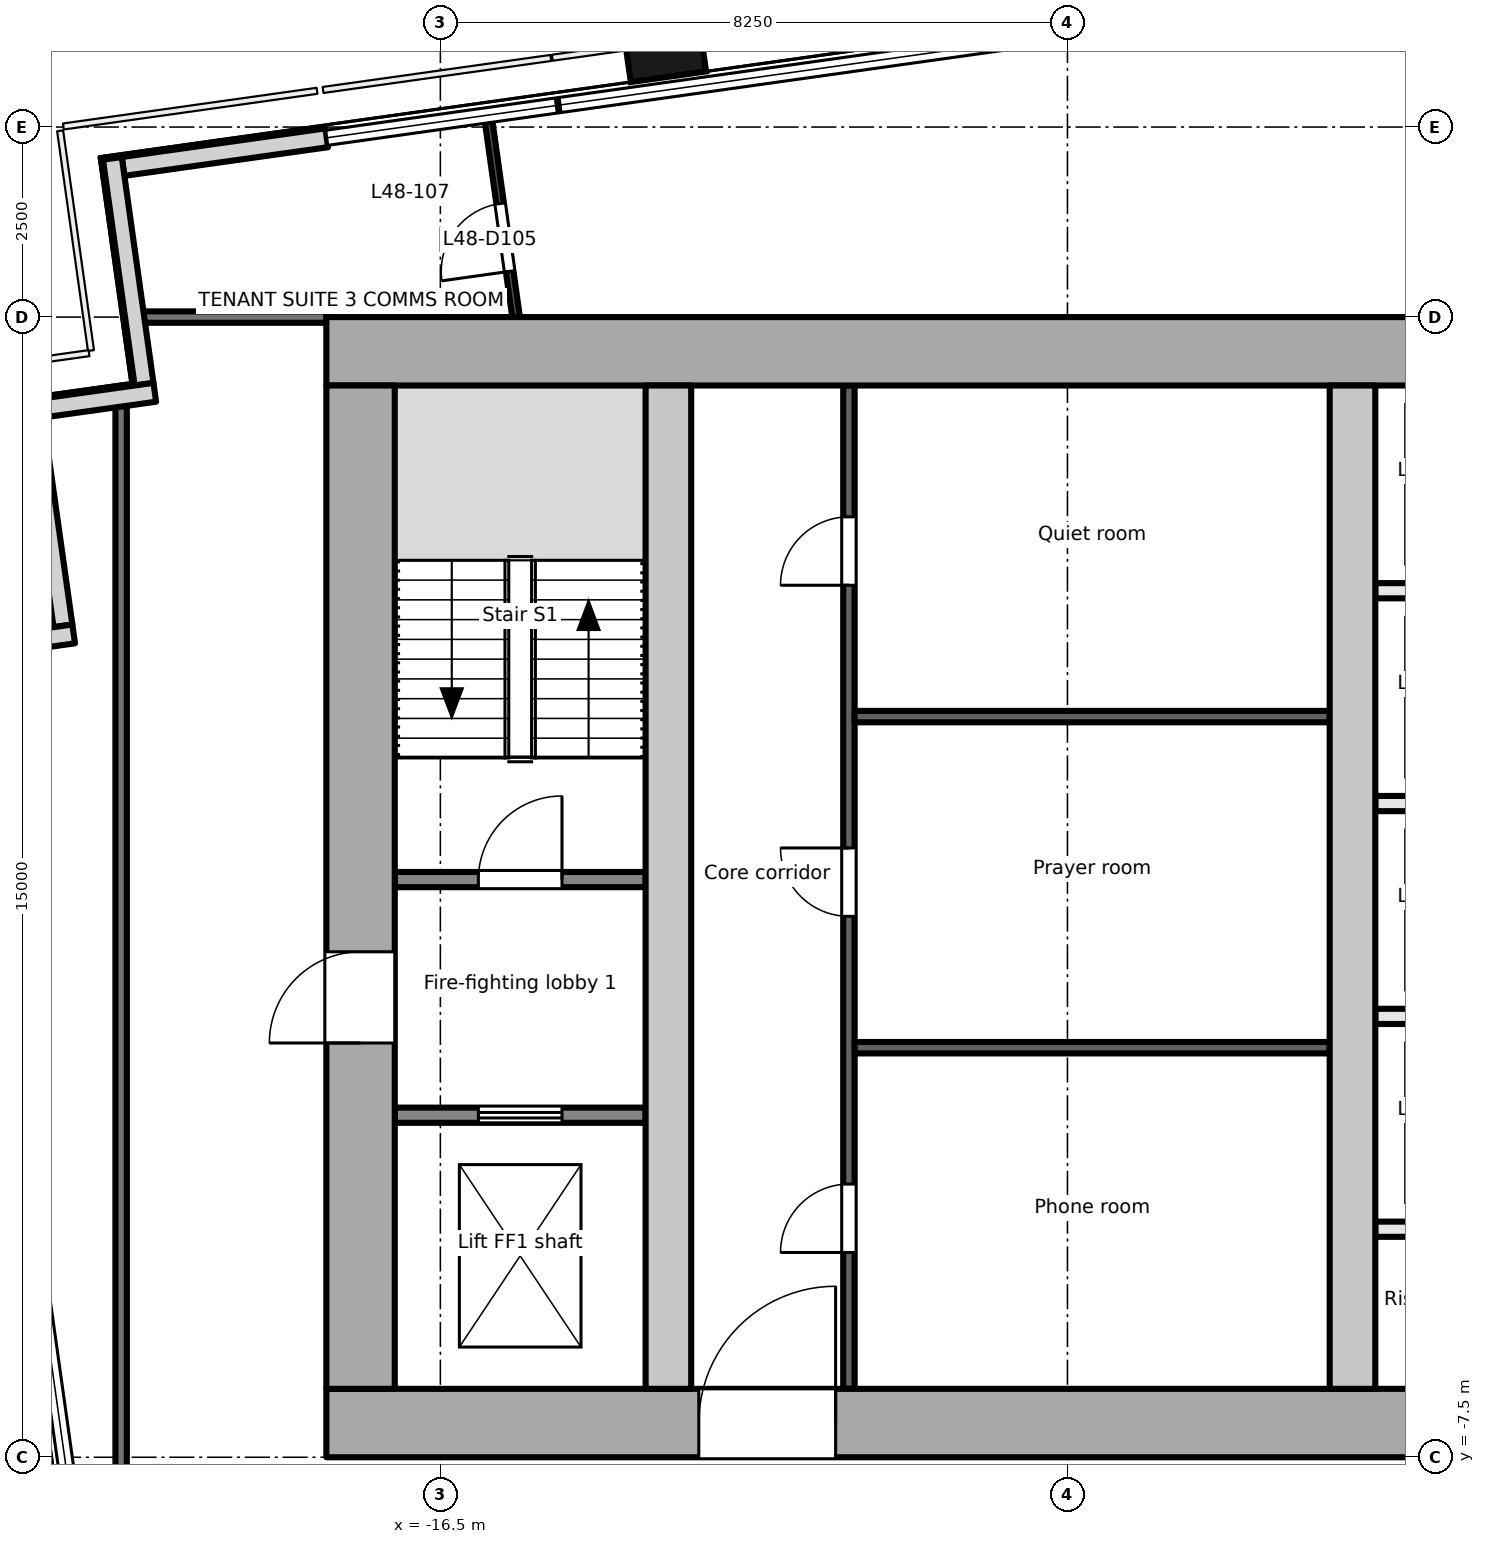
"""IFC4 building model, lengths in metres.
Left out: names, types, materials, properties, quantities, classifications, styles, units other than length and angle.
Written with IfcOpenShell. Run it as: python <this file> out.ifc"""

import sys

from ifc_helpers import new_model, si_unit, direction, frame, frame_2d, origin, origin_2d, place, context, subcontext, project, spatial, rectangle, extrude, element, fill, save


model = new_model("IFC4")
c1 = context("Model", 3, precision=1e-05, world=origin(), true_north=direction((0.0, 1.0)))
c2 = subcontext(c1, "Body", "Model", "MODEL_VIEW")
j1 = project(units=[si_unit("LENGTHUNIT", "METRE"), si_unit("PLANEANGLEUNIT", "RADIAN")], contexts=[c1])
p1 = place(None, origin())
s1 = spatial("IfcSite", under=j1, at=p1, CompositionType="ELEMENT")
p2 = place(p1, origin())
s2 = spatial("IfcBuilding", under=s1, at=p2, CompositionType="ELEMENT")
p3 = place(p2, frame((0.0, 0.0, 213.5)))
s3 = spatial("IfcBuildingStorey", under=s2, at=p3, CompositionType="ELEMENT", Elevation=213.5)
p4 = place(p3, frame((-13.625, 11.553, -0.2), z_axis=(0.0, 0.0, 1.0), x_axis=(0.990268068742, 0.13917310096, 0.0)))
e1 = element("IfcColumn", 1, at=p4, inside=s3, PredefinedType="COLUMN", context=c2, shape_type="SweptSolid", body=[
    extrude(rectangle(XDim=1.0, YDim=1.8, at=origin_2d()), origin(), (0.0, 0.0, 1.0), 3.9),
])
p5 = place(p3, frame((-17.995, 9.859, 0.0), z_axis=(0.0, 0.0, 1.0), x_axis=(-0.99024510326, -0.139336411139, 0.0)))
e2 = element("IfcWall", 2, at=p5, inside=s3, PredefinedType="SOLIDWALL", context=c2, shape_type="SweptSolid", body=[
    extrude(rectangle(XDim=2.705, YDim=0.25, at=frame_2d((1.353, 0.0))), origin(), (0.0, 0.0, 1.0), 3.7),
])
p6 = place(p3, frame((-20.815, 9.588, 0.0), z_axis=(0.0, 0.0, 1.0), x_axis=(0.138983028379, -0.9902947631, 0.0)))
e3 = element("IfcWall", 3, at=p6, inside=s3, PredefinedType="SOLIDWALL", context=c2, shape_type="SweptSolid", body=[
    extrude(rectangle(XDim=3.0, YDim=0.25, at=frame_2d((1.5, 0.0))), origin(), (0.0, 0.0, 1.0), 3.7),
])
p7 = place(p3, frame((-20.257, 6.51, 0.0), z_axis=(0.0, 0.0, 1.0), x_axis=(-0.990330117064, -0.138730887823, 0.0)))
e4 = element("IfcWall", 4, at=p7, inside=s3, PredefinedType="SOLIDWALL", context=c2, shape_type="SweptSolid", body=[
    extrude(rectangle(XDim=1.499, YDim=0.25, at=frame_2d((0.75, 0.0))), origin(), (0.0, 0.0, 1.0), 3.7),
])
p8 = place(p3, frame((-21.883, 6.409, 0.0), z_axis=(0.0, 0.0, 1.0), x_axis=(0.139324658755, -0.990246756855, 0.0)))
e5 = element("IfcWall", 5, at=p8, inside=s3, PredefinedType="SOLIDWALL", context=c2, shape_type="SweptSolid", body=[
    extrude(rectangle(XDim=3.0, YDim=0.25, at=frame_2d((1.5, 0.0))), origin(), (0.0, 0.0, 1.0), 3.7),
])
p9 = place(p3, frame((-21.324, 3.332, 0.0), z_axis=(0.0, 0.0, 1.0), x_axis=(-0.990238641016, -0.139382329723, 0.0)))
e6 = element("IfcWall", 6, at=p9, inside=s3, PredefinedType="SOLIDWALL", context=c2, shape_type="SweptSolid", body=[
    extrude(rectangle(XDim=1.526, YDim=0.25, at=frame_2d((0.763, 0.0))), origin(), (0.0, 0.0, 1.0), 3.7),
])
p10 = place(p3, frame((-18.0, -7.05, -0.2), z_axis=(0.0, 0.0, 1.0), x_axis=(1.0, 0.0, 0.0)))
e7 = element("IfcWall", 7, at=p10, inside=s3, PredefinedType="SHEAR", context=c2, shape_type="SweptSolid", body=[
    extrude(rectangle(XDim=36.0, YDim=0.9, at=frame_2d((18.0, 0.0))), origin(), (0.0, 0.0, 1.0), 3.9),
])
p11 = place(p10, frame((4.9, 0.0, 0.2)))
e8 = element("IfcOpeningElement", 8, at=p11, cuts=e7, PredefinedType="OPENING", context=c2, shape_type="SweptSolid", body=[
    extrude(rectangle(XDim=1.8, YDim=2.1, at=frame_2d((0.9, 1.05))), frame((0.0, 0.46, 0.0), z_axis=(0.0, -1.0, 0.0), x_axis=(1.0, 0.0, 0.0)), (0.0, 0.0, 1.0), 0.921),
])
p12 = place(p10, frame((16.8, 0.0, 0.2)))
e9 = element("IfcOpeningElement", 9, at=p12, cuts=e7, PredefinedType="OPENING", context=c2, shape_type="SweptSolid", body=[
    extrude(rectangle(XDim=2.4, YDim=2.1, at=frame_2d((1.2, 1.05))), frame((0.0, 0.46, 0.0), z_axis=(0.0, -1.0, 0.0), x_axis=(1.0, 0.0, 0.0)), (0.0, 0.0, 1.0), 0.921),
])
p13 = place(p10, frame((26.1, 0.0, 0.2)))
e10 = element("IfcOpeningElement", 10, at=p13, cuts=e7, PredefinedType="OPENING", context=c2, shape_type="SweptSolid", body=[
    extrude(rectangle(XDim=2.4, YDim=2.1, at=frame_2d((1.2, 1.05))), frame((0.0, 0.46, 0.0), z_axis=(0.0, -1.0, 0.0), x_axis=(1.0, 0.0, 0.0)), (0.0, 0.0, 1.0), 0.921),
])
p14 = place(p3, frame((-18.0, 7.05, -0.2), z_axis=(0.0, 0.0, 1.0), x_axis=(1.0, 0.0, 0.0)))
e11 = element("IfcWall", 11, at=p14, inside=s3, PredefinedType="SHEAR", context=c2, shape_type="SweptSolid", body=[
    extrude(rectangle(XDim=36.0, YDim=0.9, at=frame_2d((18.0, 0.0))), origin(), (0.0, 0.0, 1.0), 3.9),
])
p15 = place(p3, frame((-17.55, -6.6, -0.2), z_axis=(0.0, 0.0, 1.0), x_axis=(0.0, 1.0, 0.0)))
e12 = element("IfcWall", 12, at=p15, inside=s3, PredefinedType="SHEAR", context=c2, shape_type="SweptSolid", body=[
    extrude(rectangle(XDim=13.2, YDim=0.9, at=frame_2d((6.6, 0.0))), origin(), (0.0, 0.0, 1.0), 3.9),
])
p16 = place(p15, frame((4.55, 0.0, 0.2)))
e13 = element("IfcOpeningElement", 13, at=p16, cuts=e12, PredefinedType="OPENING", context=c2, shape_type="SweptSolid", body=[
    extrude(rectangle(XDim=1.2, YDim=2.1, at=frame_2d((0.6, 1.05))), frame((0.0, 0.46, 0.0), z_axis=(0.0, -1.0, 0.0), x_axis=(1.0, 0.0, 0.0)), (0.0, 0.0, 1.0), 0.921),
])
for number, where, z_axis, x_axis in (
    (14, (-13.5, -6.6, -0.2), (0.0, 0.0, 1.0), (0.0, 1.0, 0.0)),
    (15, (-4.5, -6.6, -0.2), (0.0, 0.0, 1.0), (0.0, 1.0, 0.0)),
):
    element("IfcWall", number, at=place(p3, frame(where, z_axis=z_axis, x_axis=x_axis)), inside=s3, PredefinedType="SHEAR", context=c2, shape_type="SweptSolid", body=[
        extrude(rectangle(XDim=13.2, YDim=0.6, at=frame_2d((6.6, 0.0))), origin(), (0.0, 0.0, 1.0), 3.9),
    ])
p17 = place(p3, frame((-17.1, -3.0, 0.0), z_axis=(0.0, 0.0, 1.0), x_axis=(1.0, 0.0, 0.0)))
e16 = element("IfcWall", 16, at=p17, inside=s3, PredefinedType="PARTITIONING", context=c2, shape_type="SweptSolid", body=[
    extrude(rectangle(XDim=3.3, YDim=0.2, at=frame_2d((1.65, 0.0))), origin(), (0.0, 0.0, 1.0), 3.7),
])
p18 = place(p17, frame((1.1, 0.0, 0.0)))
e17 = element("IfcOpeningElement", 17, at=p18, cuts=e16, PredefinedType="OPENING", context=c2, shape_type="SweptSolid", body=[
    extrude(rectangle(XDim=1.1, YDim=2.1, at=frame_2d((0.55, 1.05))), frame((0.0, 0.111, 0.0), z_axis=(0.0, -1.0, 0.0), x_axis=(1.0, 0.0, 0.0)), (0.0, 0.0, 1.0), 0.221),
])
p19 = place(p3, frame((-17.1, 0.1, 0.0), z_axis=(0.0, 0.0, 1.0), x_axis=(1.0, 0.0, 0.0)))
e18 = element("IfcWall", 18, at=p19, inside=s3, PredefinedType="PARTITIONING", context=c2, shape_type="SweptSolid", body=[
    extrude(rectangle(XDim=3.3, YDim=0.2, at=frame_2d((1.65, 0.0))), origin(), (0.0, 0.0, 1.0), 3.7),
])
p20 = place(p19, frame((1.1, 0.0, 0.0)))
e19 = element("IfcOpeningElement", 19, at=p20, cuts=e18, PredefinedType="OPENING", context=c2, shape_type="SweptSolid", body=[
    extrude(rectangle(XDim=1.1, YDim=2.1, at=frame_2d((0.55, 1.05))), frame((0.0, 0.111, 0.0), z_axis=(0.0, -1.0, 0.0), x_axis=(1.0, 0.0, 0.0)), (0.0, 0.0, 1.0), 0.221),
])
p21 = place(p3, frame((-11.125, -6.6, 0.0), z_axis=(0.0, 0.0, 1.0), x_axis=(0.0, 1.0, 0.0)))
e20 = element("IfcWall", 20, at=p21, inside=s3, PredefinedType="PARTITIONING", context=c2, shape_type="SweptSolid", body=[
    extrude(rectangle(XDim=13.2, YDim=0.15, at=frame_2d((6.6, 0.0))), origin(), (0.0, 0.0, 1.0), 3.7),
])
p22 = place(p21, frame((1.794, 0.0, 0.0)))
e21 = element("IfcOpeningElement", 21, at=p22, cuts=e20, PredefinedType="OPENING", context=c2, shape_type="SweptSolid", body=[
    extrude(rectangle(XDim=0.9, YDim=2.1, at=frame_2d((0.45, 1.05))), frame((0.0, 0.085, 0.0), z_axis=(0.0, -1.0, 0.0), x_axis=(1.0, 0.0, 0.0)), (0.0, 0.0, 1.0), 0.171),
])
p23 = place(p21, frame((6.216, 0.0, 0.0)))
e22 = element("IfcOpeningElement", 22, at=p23, cuts=e20, PredefinedType="OPENING", context=c2, shape_type="SweptSolid", body=[
    extrude(rectangle(XDim=0.9, YDim=2.1, at=frame_2d((0.45, 1.05))), frame((0.0, 0.085, 0.0), z_axis=(0.0, -1.0, 0.0), x_axis=(1.0, 0.0, 0.0)), (0.0, 0.0, 1.0), 0.171),
])
p24 = place(p21, frame((10.572, 0.0, 0.0)))
e23 = element("IfcOpeningElement", 23, at=p24, cuts=e20, PredefinedType="OPENING", context=c2, shape_type="SweptSolid", body=[
    extrude(rectangle(XDim=0.9, YDim=2.1, at=frame_2d((0.45, 1.05))), frame((0.0, 0.085, 0.0), z_axis=(0.0, -1.0, 0.0), x_axis=(1.0, 0.0, 0.0)), (0.0, 0.0, 1.0), 0.171),
])
for number, where, z_axis, x_axis in (
    (24, (-11.05, -2.112, 0.0), (0.0, 0.0, 1.0), (1.0, 0.0, 0.0)),
    (25, (-11.05, 2.244, 0.0), (0.0, 0.0, 1.0), (1.0, 0.0, 0.0)),
):
    element("IfcWall", number, at=place(p3, frame(where, z_axis=z_axis, x_axis=x_axis)), inside=s3, PredefinedType="PARTITIONING", context=c2, shape_type="SweptSolid", body=[
        extrude(rectangle(XDim=6.25, YDim=0.15, at=frame_2d((3.125, 0.0))), origin(), (0.0, 0.0, 1.0), 3.7),
    ])
for number, where, z_axis, x_axis in (
    (26, (-4.2, -1.7, 0.0), (0.0, 0.0, 1.0), (1.0, 0.0, 0.0)),
    (27, (-4.2, 1.1, 0.0), (0.0, 0.0, 1.0), (1.0, 0.0, 0.0)),
    (28, (-4.2, 3.9, 0.0), (0.0, 0.0, 1.0), (1.0, 0.0, 0.0)),
    (29, (-4.2, -4.5, 0.0), (0.0, 0.0, 1.0), (1.0, 0.0, 0.0)),
):
    element("IfcWall", number, at=place(p3, frame(where, z_axis=z_axis, x_axis=x_axis)), inside=s3, PredefinedType="PARTITIONING", context=c2, shape_type="SweptSolid", body=[
        extrude(rectangle(XDim=2.3, YDim=0.2, at=frame_2d((1.15, 0.0))), origin(), (0.0, 0.0, 1.0), 3.7),
    ])
p25 = place(p3, frame((-20.7, -10.8, 0.0), z_axis=(0.0, 0.0, 1.0), x_axis=(0.0, 1.0, 0.0)))
e30 = element("IfcWall", 30, at=p25, inside=s3, PredefinedType="PARTITIONING", context=c2, shape_type="SweptSolid", body=[
    extrude(rectangle(XDim=17.156, YDim=0.15, at=frame_2d((8.578, 0.0))), origin(), (0.0, 0.0, 1.0), 3.4),
])
p26 = place(p3, frame((-20.431, 7.5, 0.0), z_axis=(0.0, 0.0, 1.0), x_axis=(1.0, 0.0, 0.0)))
e31 = element("IfcWall", 31, at=p26, inside=s3, PredefinedType="PARTITIONING", context=c2, shape_type="SweptSolid", body=[
    extrude(rectangle(XDim=2.431, YDim=0.15, at=frame_2d((1.215, 0.0))), origin(), (0.0, 0.0, 1.0), 3.7),
])
p27 = place(p3, frame((-15.504, 7.5, 0.0), z_axis=(0.0, 0.0, 1.0), x_axis=(-0.138928669032, 0.990302390647, 0.0)))
e32 = element("IfcWall", 32, at=p27, inside=s3, PredefinedType="PARTITIONING", context=c2, shape_type="SweptSolid", body=[
    extrude(rectangle(XDim=2.592, YDim=0.1, at=frame_2d((1.296, 0.0))), origin(), (0.0, 0.0, 1.0), 3.7),
])
p28 = place(p27, frame((0.608, 0.0, 0.0)))
e33 = element("IfcOpeningElement", 33, at=p28, cuts=e32, PredefinedType="OPENING", context=c2, shape_type="SweptSolid", body=[
    extrude(rectangle(XDim=0.9, YDim=2.1, at=frame_2d((0.45, 1.05))), frame((0.0, 0.061, 0.0), z_axis=(0.0, -1.0, 0.0), x_axis=(1.0, 0.0, 0.0)), (0.0, 0.0, 1.0), 0.121),
])
p29 = place(p18, origin())
e34 = element("IfcDoor", 34, at=p29, inside=s3, OperationType="DOUBLE_DOOR_SLIDING", PredefinedType="DOOR", context=c2, shape_type="SweptSolid", body=[
    extrude(rectangle(XDim=1.1, YDim=2.1, at=frame_2d((0.55, 1.05))), frame((0.0, 0.025, 0.0), z_axis=(0.0, -1.0, 0.0), x_axis=(1.0, 0.0, 0.0)), (0.0, 0.0, 1.0), 0.05),
])
fill(e17, e34)
p30 = place(p16, origin())
e35 = element("IfcDoor", 35, at=p30, inside=s3, OperationType="SINGLE_SWING_LEFT", PredefinedType="DOOR", context=c2, shape_type="SweptSolid", body=[
    extrude(rectangle(XDim=1.2, YDim=2.1, at=frame_2d((0.6, 1.05))), frame((0.0, 0.025, 0.0), z_axis=(0.0, -1.0, 0.0), x_axis=(1.0, 0.0, 0.0)), (0.0, 0.0, 1.0), 0.05),
])
fill(e13, e35)
p31 = place(p20, origin())
e36 = element("IfcDoor", 36, at=p31, inside=s3, OperationType="SINGLE_SWING_RIGHT", PredefinedType="DOOR", context=c2, shape_type="SweptSolid", body=[
    extrude(rectangle(XDim=1.1, YDim=2.1, at=frame_2d((0.55, 1.05))), frame((0.0, 0.025, 0.0), z_axis=(0.0, -1.0, 0.0), x_axis=(1.0, 0.0, 0.0)), (0.0, 0.0, 1.0), 0.05),
])
fill(e19, e36)
p32 = place(p22, origin())
e37 = element("IfcDoor", 37, at=p32, inside=s3, OperationType="SINGLE_SWING_LEFT", PredefinedType="DOOR", context=c2, shape_type="SweptSolid", body=[
    extrude(rectangle(XDim=0.9, YDim=2.1, at=frame_2d((0.45, 1.05))), frame((0.0, 0.025, 0.0), z_axis=(0.0, -1.0, 0.0), x_axis=(1.0, 0.0, 0.0)), (0.0, 0.0, 1.0), 0.05),
])
fill(e21, e37)
p33 = place(p23, origin())
e38 = element("IfcDoor", 38, at=p33, inside=s3, OperationType="SINGLE_SWING_RIGHT", PredefinedType="DOOR", context=c2, shape_type="SweptSolid", body=[
    extrude(rectangle(XDim=0.9, YDim=2.1, at=frame_2d((0.45, 1.05))), frame((0.0, 0.025, 0.0), z_axis=(0.0, -1.0, 0.0), x_axis=(1.0, 0.0, 0.0)), (0.0, 0.0, 1.0), 0.05),
])
fill(e22, e38)
p34 = place(p24, origin())
e39 = element("IfcDoor", 39, at=p34, inside=s3, OperationType="SINGLE_SWING_LEFT", PredefinedType="DOOR", context=c2, shape_type="SweptSolid", body=[
    extrude(rectangle(XDim=0.9, YDim=2.1, at=frame_2d((0.45, 1.05))), frame((0.0, 0.025, 0.0), z_axis=(0.0, -1.0, 0.0), x_axis=(1.0, 0.0, 0.0)), (0.0, 0.0, 1.0), 0.05),
])
fill(e23, e39)
p35 = place(p11, origin())
e40 = element("IfcDoor", 40, at=p35, inside=s3, OperationType="SINGLE_SWING_RIGHT", PredefinedType="DOOR", context=c2, shape_type="SweptSolid", body=[
    extrude(rectangle(XDim=1.8, YDim=2.1, at=frame_2d((0.9, 1.05))), frame((0.0, 0.025, 0.0), z_axis=(0.0, -1.0, 0.0), x_axis=(1.0, 0.0, 0.0)), (0.0, 0.0, 1.0), 0.05),
])
fill(e8, e40)
p36 = place(p28, origin())
e41 = element("IfcDoor", 41, at=p36, inside=s3, OperationType="SINGLE_SWING_LEFT", PredefinedType="DOOR", context=c2, shape_type="SweptSolid", body=[
    extrude(rectangle(XDim=0.9, YDim=2.1, at=frame_2d((0.45, 1.05))), frame((0.0, 0.025, 0.0), z_axis=(0.0, -1.0, 0.0), x_axis=(1.0, 0.0, 0.0)), (0.0, 0.0, 1.0), 0.05),
])
fill(e33, e41)
save(model, sys.argv[1])
